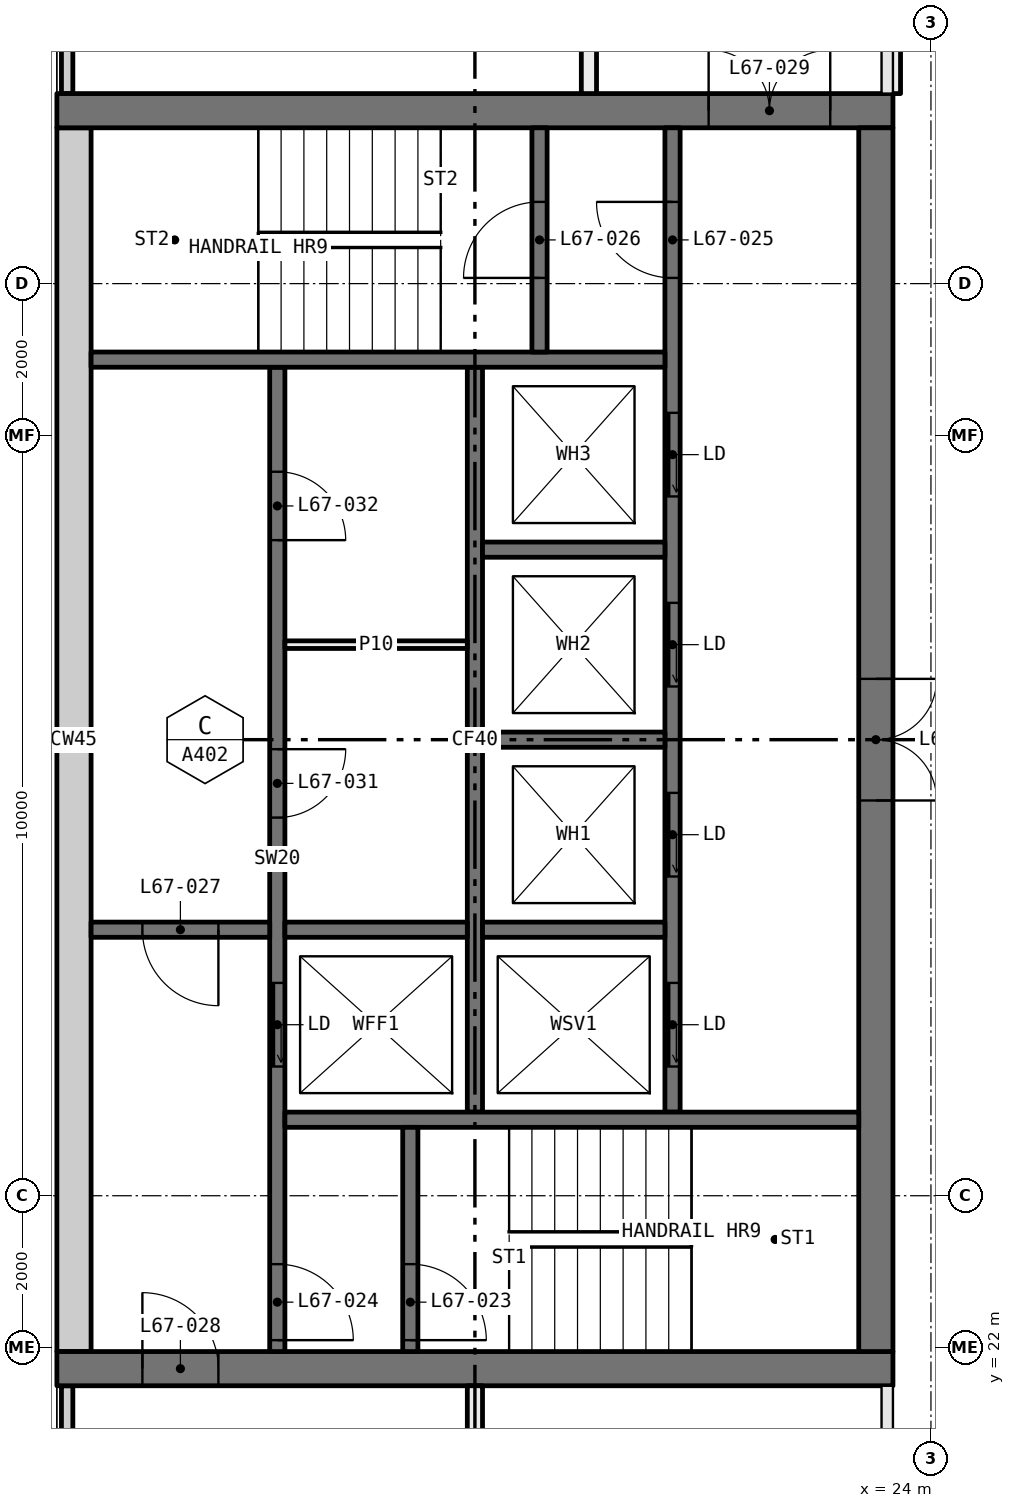
"""IFC4 building model, lengths in metres.
Left out: names, types, materials, properties, quantities, classifications, styles, units other than length and angle.
Written with IfcOpenShell. Run it as: python <this file> out.ifc"""

import sys

from ifc_helpers import new_model, si_unit, direction, frame, frame_2d, origin, place, context, subcontext, project, spatial, rectangle, extrude, element, fill, save


model = new_model("IFC4")
c1 = context("Model", 3, precision=1e-05, world=origin(), true_north=direction((0.0, 1.0)))
c2 = subcontext(c1, "Body", "Model", "MODEL_VIEW")
j1 = project(units=[si_unit("LENGTHUNIT", "METRE"), si_unit("PLANEANGLEUNIT", "RADIAN")], contexts=[c1])
p1 = place(None, origin())
s1 = spatial("IfcSite", under=j1, at=p1, CompositionType="ELEMENT")
p2 = place(p1, origin())
s2 = spatial("IfcBuilding", under=s1, at=p2, CompositionType="ELEMENT")
p3 = place(p2, frame((0.0, 0.0, 249.0)))
s3 = spatial("IfcBuildingStorey", under=s2, at=p3, CompositionType="ELEMENT", Elevation=249.0)
for number, where, z_axis, x_axis in (
    (1, (12.635, 18.71, 0.0), (0.0, 0.0, 1.0), (0.0, 1.0, 0.0)),
    (2, (12.635, 38.5, 0.0), (0.0, 0.0, 1.0), (0.0, 1.0, 0.0)),
):
    element("IfcWall", number, at=place(p3, frame(where, z_axis=z_axis, x_axis=x_axis)), inside=s3, PredefinedType="ELEMENTEDWALL", context=c2, shape_type="SweptSolid", body=[
        extrude(rectangle(XDim=2.79, YDim=0.15, at=frame_2d((1.395, 0.0))), origin(), (0.0, 0.0, 1.0), 3.05),
    ])
p4 = place(p3, frame((18.0, 21.5, 0.0), z_axis=(0.0, 0.0, 1.0), x_axis=(0.0, -1.0, 0.0)))
e3 = element("IfcWall", 3, at=p4, inside=s3, PredefinedType="PARTITIONING", context=c2, shape_type="SweptSolid", body=[
    extrude(rectangle(XDim=2.78, YDim=0.2, at=frame_2d((1.39, 0.0))), origin(), (0.0, 0.0, 1.0), 3.05),
])
p5 = place(p4, frame((0.94, 0.0, 0.0)))
e4 = element("IfcOpeningElement", 4, at=p5, cuts=e3, PredefinedType="OPENING", context=c2, shape_type="SweptSolid", body=[
    extrude(rectangle(XDim=0.9, YDim=2.1, at=frame_2d((0.45, 1.05))), frame((0.0, 0.11, 0.0), z_axis=(0.0, -1.0, 0.0), x_axis=(1.0, 0.0, 0.0)), (0.0, 0.0, 1.0), 0.22),
])
p6 = place(p3, frame((19.5, 38.5, 0.0), z_axis=(0.0, 0.0, 1.0), x_axis=(0.0, 1.0, 0.0)))
e5 = element("IfcWall", 5, at=p6, inside=s3, PredefinedType="PARTITIONING", context=c2, shape_type="SweptSolid", body=[
    extrude(rectangle(XDim=3.5, YDim=0.2, at=frame_2d((1.75, 0.0))), origin(), (0.0, 0.0, 1.0), 3.05),
])
p7 = place(p3, frame((23.5, 41.9, 0.0), z_axis=(0.0, 0.0, 1.0), x_axis=(0.0, -1.0, 0.0)))
e6 = element("IfcWall", 6, at=p7, inside=s3, PredefinedType="PARTITIONING", context=c2, shape_type="SweptSolid", body=[
    extrude(rectangle(XDim=3.4, YDim=0.2, at=frame_2d((1.7, 0.0))), origin(), (0.0, 0.0, 1.0), 3.05),
])
p8 = place(p3, frame((12.5, 21.725, 0.0), z_axis=(0.0, 0.0, 1.0), x_axis=(1.0, 0.0, 0.0)))
e7 = element("IfcWall", 7, at=p8, inside=s3, PredefinedType="SHEAR", context=c2, shape_type="SweptSolid", body=[
    extrude(rectangle(XDim=11.0, YDim=0.45, at=frame_2d((5.5, 0.0))), origin(), (0.0, 0.0, 1.0), 3.05),
])
p9 = place(p8, frame((1.125, 0.0, 0.0)))
e8 = element("IfcOpeningElement", 8, at=p9, cuts=e7, PredefinedType="OPENING", context=c2, shape_type="SweptSolid", body=[
    extrude(rectangle(XDim=1.0, YDim=2.1, at=frame_2d((0.5, 1.05))), frame((0.0, 0.235, 0.0), z_axis=(0.0, -1.0, 0.0), x_axis=(1.0, 0.0, 0.0)), (0.0, 0.0, 1.0), 0.47),
])
p10 = place(p3, frame((12.5, 38.275, 0.0), z_axis=(0.0, 0.0, 1.0), x_axis=(1.0, 0.0, 0.0)))
e9 = element("IfcWall", 9, at=p10, inside=s3, PredefinedType="SHEAR", context=c2, shape_type="SweptSolid", body=[
    extrude(rectangle(XDim=11.0, YDim=0.45, at=frame_2d((5.5, 0.0))), origin(), (0.0, 0.0, 1.0), 3.05),
])
p11 = place(p10, frame((8.575, 0.0, 0.0)))
e10 = element("IfcOpeningElement", 10, at=p11, cuts=e9, PredefinedType="OPENING", context=c2, shape_type="SweptSolid", body=[
    extrude(rectangle(XDim=1.6, YDim=2.1, at=frame_2d((0.8, 1.05))), frame((0.0, 0.235, 0.0), z_axis=(0.0, -1.0, 0.0), x_axis=(1.0, 0.0, 0.0)), (0.0, 0.0, 1.0), 0.47),
])
p12 = place(p3, frame((12.725, 21.95, 0.0), z_axis=(0.0, 0.0, 1.0), x_axis=(0.0, 1.0, 0.0)))
e11 = element("IfcWall", 11, at=p12, inside=s3, PredefinedType="SHEAR", context=c2, shape_type="SweptSolid", body=[
    extrude(rectangle(XDim=16.1, YDim=0.45, at=frame_2d((8.05, 0.0))), origin(), (0.0, 0.0, 1.0), 3.05),
])
p13 = place(p3, frame((23.275, 21.95, 0.0), z_axis=(0.0, 0.0, 1.0), x_axis=(0.0, 1.0, 0.0)))
e12 = element("IfcWall", 12, at=p13, inside=s3, PredefinedType="SHEAR", context=c2, shape_type="SweptSolid", body=[
    extrude(rectangle(XDim=16.1, YDim=0.45, at=frame_2d((8.05, 0.0))), origin(), (0.0, 0.0, 1.0), 3.05),
])
p14 = place(p13, frame((7.25, 0.0, 0.0)))
e13 = element("IfcOpeningElement", 13, at=p14, cuts=e12, PredefinedType="OPENING", context=c2, shape_type="SweptSolid", body=[
    extrude(rectangle(XDim=1.6, YDim=2.1, at=frame_2d((0.8, 1.05))), frame((0.0, 0.235, 0.0), z_axis=(0.0, -1.0, 0.0), x_axis=(1.0, 0.0, 0.0)), (0.0, 0.0, 1.0), 0.47),
])
p15 = place(p3, frame((15.4, 21.95, 0.0), z_axis=(0.0, 0.0, 1.0), x_axis=(0.0, 1.0, 0.0)))
e14 = element("IfcWall", 14, at=p15, inside=s3, PredefinedType="SOLIDWALL", context=c2, shape_type="SweptSolid", body=[
    extrude(rectangle(XDim=12.95, YDim=0.2, at=frame_2d((6.475, 0.0))), origin(), (0.0, 0.0, 1.0), 3.05),
])
p16 = place(p15, frame((3.75, 0.0, 0.0)))
e15 = element("IfcOpeningElement", 15, at=p16, cuts=e14, PredefinedType="OPENING", context=c2, shape_type="SweptSolid", body=[
    extrude(rectangle(XDim=1.1, YDim=2.1, at=frame_2d((0.55, 1.05))), frame((0.0, 0.11, 0.0), z_axis=(0.0, -1.0, 0.0), x_axis=(1.0, 0.0, 0.0)), (0.0, 0.0, 1.0), 0.22),
])
p17 = place(p15, frame((0.15, 0.0, 0.0)))
e16 = element("IfcOpeningElement", 16, at=p17, cuts=e14, PredefinedType="OPENING", context=c2, shape_type="SweptSolid", body=[
    extrude(rectangle(XDim=1.0, YDim=2.1, at=frame_2d((0.5, 1.05))), frame((0.0, 0.11, 0.0), z_axis=(0.0, -1.0, 0.0), x_axis=(1.0, 0.0, 0.0)), (0.0, 0.0, 1.0), 0.22),
])
p18 = place(p15, frame((7.025, 0.0, 0.0)))
e17 = element("IfcOpeningElement", 17, at=p18, cuts=e14, PredefinedType="OPENING", context=c2, shape_type="SweptSolid", body=[
    extrude(rectangle(XDim=0.9, YDim=2.1, at=frame_2d((0.45, 1.05))), frame((0.0, 0.11, 0.0), z_axis=(0.0, -1.0, 0.0), x_axis=(1.0, 0.0, 0.0)), (0.0, 0.0, 1.0), 0.22),
])
p19 = place(p15, frame((10.675, 0.0, 0.0)))
e18 = element("IfcOpeningElement", 18, at=p19, cuts=e14, PredefinedType="OPENING", context=c2, shape_type="SweptSolid", body=[
    extrude(rectangle(XDim=0.9, YDim=2.1, at=frame_2d((0.45, 1.05))), frame((0.0, 0.11, 0.0), z_axis=(0.0, -1.0, 0.0), x_axis=(1.0, 0.0, 0.0)), (0.0, 0.0, 1.0), 0.22),
])
p20 = place(p3, frame((20.6, 25.1, 0.0), z_axis=(0.0, 0.0, 1.0), x_axis=(0.0, 1.0, 0.0)))
e19 = element("IfcWall", 19, at=p20, inside=s3, PredefinedType="SOLIDWALL", context=c2, shape_type="SweptSolid", body=[
    extrude(rectangle(XDim=12.95, YDim=0.2, at=frame_2d((6.475, 0.0))), origin(), (0.0, 0.0, 1.0), 3.05),
])
p21 = place(p20, frame((0.6, 0.0, 0.0)))
e20 = element("IfcOpeningElement", 20, at=p21, cuts=e19, PredefinedType="OPENING", context=c2, shape_type="SweptSolid", body=[
    extrude(rectangle(XDim=1.1, YDim=2.1, at=frame_2d((0.55, 1.05))), frame((0.0, 0.11, 0.0), z_axis=(0.0, -1.0, 0.0), x_axis=(1.0, 0.0, 0.0)), (0.0, 0.0, 1.0), 0.22),
])
p22 = place(p20, frame((3.1, 0.0, 0.0)))
e21 = element("IfcOpeningElement", 21, at=p22, cuts=e19, PredefinedType="OPENING", context=c2, shape_type="SweptSolid", body=[
    extrude(rectangle(XDim=1.1, YDim=2.1, at=frame_2d((0.55, 1.05))), frame((0.0, 0.11, 0.0), z_axis=(0.0, -1.0, 0.0), x_axis=(1.0, 0.0, 0.0)), (0.0, 0.0, 1.0), 0.22),
])
p23 = place(p20, frame((5.6, 0.0, 0.0)))
e22 = element("IfcOpeningElement", 22, at=p23, cuts=e19, PredefinedType="OPENING", context=c2, shape_type="SweptSolid", body=[
    extrude(rectangle(XDim=1.1, YDim=2.1, at=frame_2d((0.55, 1.05))), frame((0.0, 0.11, 0.0), z_axis=(0.0, -1.0, 0.0), x_axis=(1.0, 0.0, 0.0)), (0.0, 0.0, 1.0), 0.22),
])
p24 = place(p20, frame((8.1, 0.0, 0.0)))
e23 = element("IfcOpeningElement", 23, at=p24, cuts=e19, PredefinedType="OPENING", context=c2, shape_type="SweptSolid", body=[
    extrude(rectangle(XDim=1.1, YDim=2.1, at=frame_2d((0.55, 1.05))), frame((0.0, 0.11, 0.0), z_axis=(0.0, -1.0, 0.0), x_axis=(1.0, 0.0, 0.0)), (0.0, 0.0, 1.0), 0.22),
])
p25 = place(p20, frame((10.975, 0.0, 0.0)))
e24 = element("IfcOpeningElement", 24, at=p25, cuts=e19, PredefinedType="OPENING", context=c2, shape_type="SweptSolid", body=[
    extrude(rectangle(XDim=1.0, YDim=2.1, at=frame_2d((0.5, 1.05))), frame((0.0, 0.11, 0.0), z_axis=(0.0, -1.0, 0.0), x_axis=(1.0, 0.0, 0.0)), (0.0, 0.0, 1.0), 0.22),
])
p26 = place(p3, frame((18.0, 25.1, 0.0), z_axis=(0.0, 0.0, 1.0), x_axis=(0.0, 1.0, 0.0)))
e25 = element("IfcWall", 25, at=p26, inside=s3, PredefinedType="SOLIDWALL", context=c2, shape_type="SweptSolid", body=[
    extrude(rectangle(XDim=9.8, YDim=0.2, at=frame_2d((4.9, 0.0))), origin(), (0.0, 0.0, 1.0), 3.05),
])
for number, where, z_axis, x_axis in (
    (26, (15.5, 25.0, 0.0), (0.0, 0.0, 1.0), (1.0, 0.0, 0.0)),
    (27, (12.95, 35.0, 0.0), (0.0, 0.0, 1.0), (1.0, 0.0, 0.0)),
):
    element("IfcWall", number, at=place(p3, frame(where, z_axis=z_axis, x_axis=x_axis)), inside=s3, PredefinedType="SOLIDWALL", context=c2, shape_type="SweptSolid", body=[
        extrude(rectangle(XDim=7.55, YDim=0.2, at=frame_2d((3.775, 0.0))), origin(), (0.0, 0.0, 1.0), 3.05),
    ])
p27 = place(p3, frame((12.95, 27.5, 0.0), z_axis=(0.0, 0.0, 1.0), x_axis=(1.0, 0.0, 0.0)))
e28 = element("IfcWall", 28, at=p27, inside=s3, PredefinedType="SOLIDWALL", context=c2, shape_type="SweptSolid", body=[
    extrude(rectangle(XDim=2.35, YDim=0.2, at=frame_2d((1.175, 0.0))), origin(), (0.0, 0.0, 1.0), 3.05),
])
p28 = place(p27, frame((0.675, 0.0, 0.0)))
e29 = element("IfcOpeningElement", 29, at=p28, cuts=e28, PredefinedType="OPENING", context=c2, shape_type="SweptSolid", body=[
    extrude(rectangle(XDim=1.0, YDim=2.1, at=frame_2d((0.5, 1.05))), frame((0.0, 0.11, 0.0), z_axis=(0.0, -1.0, 0.0), x_axis=(1.0, 0.0, 0.0)), (0.0, 0.0, 1.0), 0.22),
])
p29 = place(p3, frame((17.15, 21.95, 0.0), z_axis=(0.0, 0.0, 1.0), x_axis=(0.0, 1.0, 0.0)))
e30 = element("IfcWall", 30, at=p29, inside=s3, PredefinedType="SOLIDWALL", context=c2, shape_type="SweptSolid", body=[
    extrude(rectangle(XDim=2.95, YDim=0.2, at=frame_2d((1.475, 0.0))), origin(), (0.0, 0.0, 1.0), 3.05),
])
p30 = place(p29, frame((0.15, 0.0, 0.0)))
e31 = element("IfcOpeningElement", 31, at=p30, cuts=e30, PredefinedType="OPENING", context=c2, shape_type="SweptSolid", body=[
    extrude(rectangle(XDim=1.0, YDim=2.1, at=frame_2d((0.5, 1.05))), frame((0.0, 0.11, 0.0), z_axis=(0.0, -1.0, 0.0), x_axis=(1.0, 0.0, 0.0)), (0.0, 0.0, 1.0), 0.22),
])
p31 = place(p3, frame((18.85, 35.1, 0.0), z_axis=(0.0, 0.0, 1.0), x_axis=(0.0, 1.0, 0.0)))
e32 = element("IfcWall", 32, at=p31, inside=s3, PredefinedType="SOLIDWALL", context=c2, shape_type="SweptSolid", body=[
    extrude(rectangle(XDim=2.95, YDim=0.2, at=frame_2d((1.475, 0.0))), origin(), (0.0, 0.0, 1.0), 3.05),
])
p32 = place(p31, frame((0.975, 0.0, 0.0)))
e33 = element("IfcOpeningElement", 33, at=p32, cuts=e32, PredefinedType="OPENING", context=c2, shape_type="SweptSolid", body=[
    extrude(rectangle(XDim=1.0, YDim=2.1, at=frame_2d((0.5, 1.05))), frame((0.0, 0.11, 0.0), z_axis=(0.0, -1.0, 0.0), x_axis=(1.0, 0.0, 0.0)), (0.0, 0.0, 1.0), 0.22),
])
for number, where, z_axis, x_axis in (
    (34, (15.5, 27.5, 0.0), (0.0, 0.0, 1.0), (1.0, 0.0, 0.0)),
    (35, (18.1, 27.5, 0.0), (0.0, 0.0, 1.0), (1.0, 0.0, 0.0)),
    (36, (18.1, 30.0, 0.0), (0.0, 0.0, 1.0), (1.0, 0.0, 0.0)),
    (37, (18.1, 32.5, 0.0), (0.0, 0.0, 1.0), (1.0, 0.0, 0.0)),
):
    element("IfcWall", number, at=place(p3, frame(where, z_axis=z_axis, x_axis=x_axis)), inside=s3, PredefinedType="SOLIDWALL", context=c2, shape_type="SweptSolid", body=[
        extrude(rectangle(XDim=2.4, YDim=0.2, at=frame_2d((1.2, 0.0))), origin(), (0.0, 0.0, 1.0), 3.05),
    ])
p33 = place(p3, frame((15.5, 31.25, 0.0), z_axis=(0.0, 0.0, 1.0), x_axis=(1.0, 0.0, 0.0)))
e38 = element("IfcWall", 38, at=p33, inside=s3, PredefinedType="PARTITIONING", context=c2, shape_type="SweptSolid", body=[
    extrude(rectangle(XDim=2.4, YDim=0.1, at=frame_2d((1.2, 0.0))), origin(), (0.0, 0.0, 1.0), 3.05),
])
p34 = place(p21, origin())
e39 = element("IfcDoor", 39, at=p34, inside=s3, OperationType="SLIDING_TO_LEFT", PredefinedType="DOOR", context=c2, shape_type="SweptSolid", body=[
    extrude(rectangle(XDim=1.1, YDim=2.1, at=frame_2d((0.55, 1.05))), frame((0.0, 0.025, 0.0), z_axis=(0.0, -1.0, 0.0), x_axis=(1.0, 0.0, 0.0)), (0.0, 0.0, 1.0), 0.05),
])
fill(e20, e39)
p35 = place(p22, origin())
e40 = element("IfcDoor", 40, at=p35, inside=s3, OperationType="SLIDING_TO_LEFT", PredefinedType="DOOR", context=c2, shape_type="SweptSolid", body=[
    extrude(rectangle(XDim=1.1, YDim=2.1, at=frame_2d((0.55, 1.05))), frame((0.0, 0.025, 0.0), z_axis=(0.0, -1.0, 0.0), x_axis=(1.0, 0.0, 0.0)), (0.0, 0.0, 1.0), 0.05),
])
fill(e21, e40)
p36 = place(p23, origin())
e41 = element("IfcDoor", 41, at=p36, inside=s3, OperationType="SLIDING_TO_LEFT", PredefinedType="DOOR", context=c2, shape_type="SweptSolid", body=[
    extrude(rectangle(XDim=1.1, YDim=2.1, at=frame_2d((0.55, 1.05))), frame((0.0, 0.025, 0.0), z_axis=(0.0, -1.0, 0.0), x_axis=(1.0, 0.0, 0.0)), (0.0, 0.0, 1.0), 0.05),
])
fill(e22, e41)
p37 = place(p24, origin())
e42 = element("IfcDoor", 42, at=p37, inside=s3, OperationType="SLIDING_TO_LEFT", PredefinedType="DOOR", context=c2, shape_type="SweptSolid", body=[
    extrude(rectangle(XDim=1.1, YDim=2.1, at=frame_2d((0.55, 1.05))), frame((0.0, 0.025, 0.0), z_axis=(0.0, -1.0, 0.0), x_axis=(1.0, 0.0, 0.0)), (0.0, 0.0, 1.0), 0.05),
])
fill(e23, e42)
p38 = place(p16, origin())
e43 = element("IfcDoor", 43, at=p38, inside=s3, OperationType="SLIDING_TO_LEFT", PredefinedType="DOOR", context=c2, shape_type="SweptSolid", body=[
    extrude(rectangle(XDim=1.1, YDim=2.1, at=frame_2d((0.55, 1.05))), frame((0.0, 0.025, 0.0), z_axis=(0.0, -1.0, 0.0), x_axis=(1.0, 0.0, 0.0)), (0.0, 0.0, 1.0), 0.05),
])
fill(e15, e43)
p39 = place(p30, frame((1.0, 0.0, 0.0), x_axis=(-1.0, 0.0, 0.0)))
e44 = element("IfcDoor", 44, at=p39, inside=s3, OperationType="SINGLE_SWING_LEFT", PredefinedType="DOOR", context=c2, shape_type="SweptSolid", body=[
    extrude(rectangle(XDim=1.0, YDim=2.1, at=frame_2d((0.5, 1.05))), frame((0.0, 0.025, 0.0), z_axis=(0.0, -1.0, 0.0), x_axis=(1.0, 0.0, 0.0)), (0.0, 0.0, 1.0), 0.05),
])
fill(e31, e44)
p40 = place(p17, frame((1.0, 0.0, 0.0), x_axis=(-1.0, 0.0, 0.0)))
e45 = element("IfcDoor", 45, at=p40, inside=s3, OperationType="SINGLE_SWING_LEFT", PredefinedType="DOOR", context=c2, shape_type="SweptSolid", body=[
    extrude(rectangle(XDim=1.0, YDim=2.1, at=frame_2d((0.5, 1.05))), frame((0.0, 0.025, 0.0), z_axis=(0.0, -1.0, 0.0), x_axis=(1.0, 0.0, 0.0)), (0.0, 0.0, 1.0), 0.05),
])
fill(e16, e45)
p41 = place(p25, origin())
e46 = element("IfcDoor", 46, at=p41, inside=s3, OperationType="SINGLE_SWING_LEFT", PredefinedType="DOOR", context=c2, shape_type="SweptSolid", body=[
    extrude(rectangle(XDim=1.0, YDim=2.1, at=frame_2d((0.5, 1.05))), frame((0.0, 0.025, 0.0), z_axis=(0.0, -1.0, 0.0), x_axis=(1.0, 0.0, 0.0)), (0.0, 0.0, 1.0), 0.05),
])
fill(e24, e46)
p42 = place(p32, origin())
e47 = element("IfcDoor", 47, at=p42, inside=s3, OperationType="SINGLE_SWING_RIGHT", PredefinedType="DOOR", context=c2, shape_type="SweptSolid", body=[
    extrude(rectangle(XDim=1.0, YDim=2.1, at=frame_2d((0.5, 1.05))), frame((0.0, 0.025, 0.0), z_axis=(0.0, -1.0, 0.0), x_axis=(1.0, 0.0, 0.0)), (0.0, 0.0, 1.0), 0.05),
])
fill(e33, e47)
p43 = place(p28, frame((1.0, 0.0, 0.0), x_axis=(-1.0, 0.0, 0.0)))
e48 = element("IfcDoor", 48, at=p43, inside=s3, OperationType="SINGLE_SWING_RIGHT", PredefinedType="DOOR", context=c2, shape_type="SweptSolid", body=[
    extrude(rectangle(XDim=1.0, YDim=2.1, at=frame_2d((0.5, 1.05))), frame((0.0, 0.025, 0.0), z_axis=(0.0, -1.0, 0.0), x_axis=(1.0, 0.0, 0.0)), (0.0, 0.0, 1.0), 0.05),
])
fill(e29, e48)
p44 = place(p9, origin())
e49 = element("IfcDoor", 49, at=p44, inside=s3, OperationType="SINGLE_SWING_RIGHT", PredefinedType="DOOR", context=c2, shape_type="SweptSolid", body=[
    extrude(rectangle(XDim=1.0, YDim=2.1, at=frame_2d((0.5, 1.05))), frame((0.0, 0.025, 0.0), z_axis=(0.0, -1.0, 0.0), x_axis=(1.0, 0.0, 0.0)), (0.0, 0.0, 1.0), 0.05),
])
fill(e8, e49)
p45 = place(p11, origin())
e50 = element("IfcDoor", 50, at=p45, inside=s3, OperationType="DOUBLE_DOOR_SINGLE_SWING", PredefinedType="DOOR", context=c2, shape_type="SweptSolid", body=[
    extrude(rectangle(XDim=1.6, YDim=2.1, at=frame_2d((0.8, 1.05))), frame((0.0, 0.025, 0.0), z_axis=(0.0, -1.0, 0.0), x_axis=(1.0, 0.0, 0.0)), (0.0, 0.0, 1.0), 0.05),
])
fill(e10, e50)
p46 = place(p14, frame((1.6, 0.0, 0.0), x_axis=(-1.0, 0.0, 0.0)))
e51 = element("IfcDoor", 51, at=p46, inside=s3, OperationType="DOUBLE_DOOR_SINGLE_SWING", PredefinedType="DOOR", context=c2, shape_type="SweptSolid", body=[
    extrude(rectangle(XDim=1.6, YDim=2.1, at=frame_2d((0.8, 1.05))), frame((0.0, 0.025, 0.0), z_axis=(0.0, -1.0, 0.0), x_axis=(1.0, 0.0, 0.0)), (0.0, 0.0, 1.0), 0.05),
])
fill(e13, e51)
p47 = place(p18, frame((0.9, 0.0, 0.0), x_axis=(-1.0, 0.0, 0.0)))
e52 = element("IfcDoor", 52, at=p47, inside=s3, OperationType="SINGLE_SWING_RIGHT", PredefinedType="DOOR", context=c2, shape_type="SweptSolid", body=[
    extrude(rectangle(XDim=0.9, YDim=2.1, at=frame_2d((0.45, 1.05))), frame((0.0, 0.025, 0.0), z_axis=(0.0, -1.0, 0.0), x_axis=(1.0, 0.0, 0.0)), (0.0, 0.0, 1.0), 0.05),
])
fill(e17, e52)
p48 = place(p19, frame((0.9, 0.0, 0.0), x_axis=(-1.0, 0.0, 0.0)))
e53 = element("IfcDoor", 53, at=p48, inside=s3, OperationType="SINGLE_SWING_LEFT", PredefinedType="DOOR", context=c2, shape_type="SweptSolid", body=[
    extrude(rectangle(XDim=0.9, YDim=2.1, at=frame_2d((0.45, 1.05))), frame((0.0, 0.025, 0.0), z_axis=(0.0, -1.0, 0.0), x_axis=(1.0, 0.0, 0.0)), (0.0, 0.0, 1.0), 0.05),
])
fill(e18, e53)
save(model, sys.argv[1])
